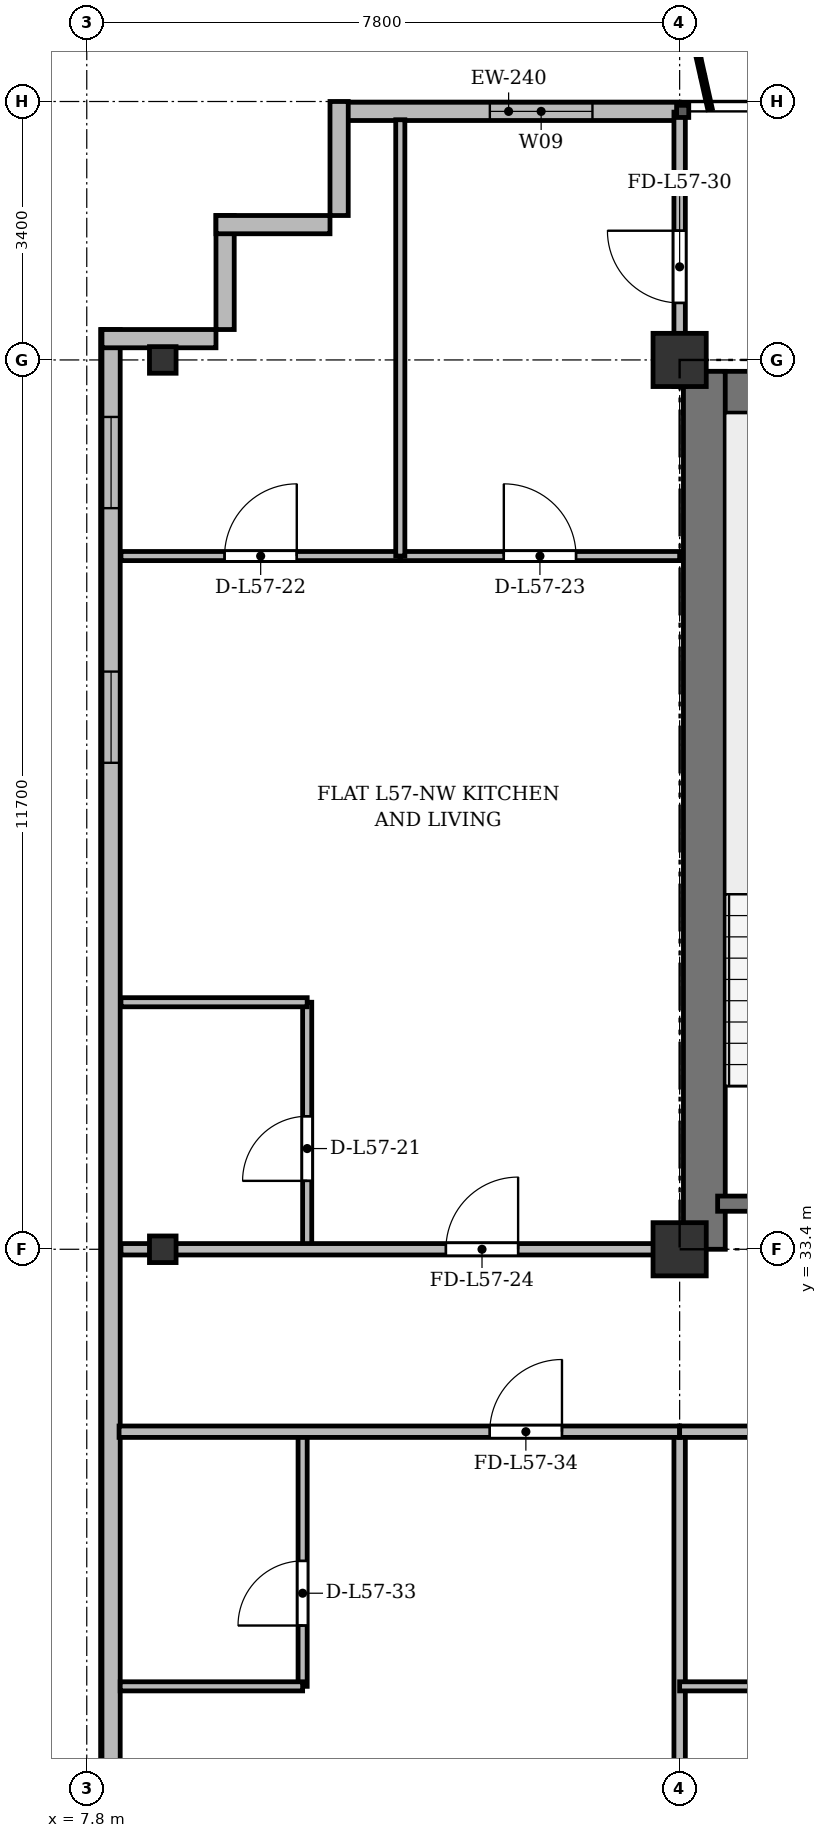
"""IFC4 building model, lengths in metres.
Left out: names, types, materials, properties, quantities, classifications, styles, units other than length and angle.
Written with IfcOpenShell. Run it as: python <this file> out.ifc"""

import sys

from ifc_helpers import new_model, si_unit, direction, frame, frame_2d, origin, origin_2d, place, context, subcontext, project, spatial, rectangle, i_section, extrude, source, transform, mapped, element, fill, save


model = new_model("IFC4")
c1 = context("Model", 3, precision=1e-05, world=origin(), true_north=direction((0.0, 1.0)))
c2 = subcontext(c1, "Body", "Model", "MODEL_VIEW")
j1 = project(units=[si_unit("LENGTHUNIT", "METRE"), si_unit("PLANEANGLEUNIT", "RADIAN")], contexts=[c1])
p1 = place(None, origin())
s1 = spatial("IfcSite", under=j1, at=p1, CompositionType="ELEMENT")
p2 = place(p1, origin())
s2 = spatial("IfcBuilding", under=s1, at=p2, CompositionType="ELEMENT")
p3 = place(p2, frame((0.0, 0.0, 219.3)))
s3 = spatial("IfcBuildingStorey", under=s2, at=p3, CompositionType="ELEMENT", Elevation=219.3)
m1 = source(origin(), c2, "Body", "SweptSolid", [
    extrude(i_section(OverallWidth=0.35, OverallDepth=0.35, WebThickness=0.018, FlangeThickness=0.028, at=origin_2d()), origin(), (0.0, 0.0, 1.0), 3.6),
])
for number, where, z_axis, x_axis in (
    (1, (8.8, 33.4, 0.0), (0.0, 0.0, 1.0), (1.0, 0.0, 0.0)),
    (2, (8.8, 45.1, 0.0), (0.0, 0.0, 1.0), (1.0, 0.0, 0.0)),
):
    element("IfcColumn", number, at=place(p3, frame(where, z_axis=z_axis, x_axis=x_axis)), inside=s3, PredefinedType="COLUMN", context=c2, shape_type="MappedRepresentation", body=[
        mapped(m1, transform((0.0, 0.0, 0.0), x_axis=(1.0, 0.0, 0.0), y_axis=(0.0, 1.0, 0.0), z_axis=(0.0, 0.0, 1.0), scale=1.0)),
    ])
m2 = source(origin(), c2, "Body", "SweptSolid", [
    extrude(rectangle(XDim=0.7, YDim=0.7, at=origin_2d()), origin(), (0.0, 0.0, 1.0), 3.6),
])
for number, where, z_axis, x_axis in (
    (3, (15.6, 33.4, 0.0), (0.0, 0.0, 1.0), (1.0, 0.0, 0.0)),
    (4, (15.6, 45.1, 0.0), (0.0, 0.0, 1.0), (1.0, 0.0, 0.0)),
):
    element("IfcColumn", number, at=place(p3, frame(where, z_axis=z_axis, x_axis=x_axis)), inside=s3, PredefinedType="COLUMN", context=c2, shape_type="MappedRepresentation", body=[
        mapped(m2, transform((0.0, 0.0, 0.0), x_axis=(1.0, 0.0, 0.0), y_axis=(0.0, 1.0, 0.0), z_axis=(0.0, 0.0, 1.0), scale=1.0)),
    ])
p4 = place(p3, frame((11.1, 48.37, 0.0), z_axis=(0.0, 0.0, 1.0), x_axis=(1.0, 0.0, 0.0)))
e5 = element("IfcWall", 5, at=p4, inside=s3, PredefinedType="SOLIDWALL", context=c2, shape_type="SweptSolid", body=[
    extrude(rectangle(XDim=4.5, YDim=0.24, at=frame_2d((2.25, 0.0))), origin(), (0.0, 0.0, 1.0), 3.36),
])
p5 = place(p4, frame((2.003, 0.0, 0.9)))
e6 = element("IfcOpeningElement", 6, at=p5, cuts=e5, PredefinedType="OPENING", context=c2, shape_type="SweptSolid", body=[
    extrude(rectangle(XDim=1.35, YDim=1.5, at=frame_2d((0.675, 0.75))), frame((0.0, 0.13, 0.0), z_axis=(0.0, -1.0, 0.0), x_axis=(1.0, 0.0, 0.0)), (0.0, 0.0, 1.0), 0.26),
])
p6 = place(p3, frame((8.12, 6.4, 0.0), z_axis=(0.0, 0.0, 1.0), x_axis=(0.0, 1.0, 0.0)))
e7 = element("IfcWall", 7, at=p6, inside=s3, PredefinedType="SOLIDWALL", context=c2, shape_type="SweptSolid", body=[
    extrude(rectangle(XDim=39.1, YDim=0.24, at=frame_2d((19.55, 0.0))), origin(), (0.0, 0.0, 1.0), 3.36),
])
p7 = place(p6, frame((1.45, 0.0, 0.92)))
e8 = element("IfcOpeningElement", 8, at=p7, cuts=e7, PredefinedType="OPENING", context=c2, shape_type="SweptSolid", body=[
    extrude(rectangle(XDim=1.2, YDim=1.65, at=frame_2d((0.6, 0.825))), frame((0.0, 0.13, 0.0), z_axis=(0.0, -1.0, 0.0), x_axis=(1.0, 0.0, 0.0)), (0.0, 0.0, 1.0), 0.26),
])
p8 = place(p6, frame((3.8, 0.0, 0.92)))
e9 = element("IfcOpeningElement", 9, at=p8, cuts=e7, PredefinedType="OPENING", context=c2, shape_type="SweptSolid", body=[
    extrude(rectangle(XDim=2.4, YDim=2.1, at=frame_2d((1.2, 1.05))), frame((0.0, 0.13, 0.0), z_axis=(0.0, -1.0, 0.0), x_axis=(1.0, 0.0, 0.0)), (0.0, 0.0, 1.0), 0.26),
])
p9 = place(p6, frame((8.0, 0.0, 0.92)))
e10 = element("IfcOpeningElement", 10, at=p9, cuts=e7, PredefinedType="OPENING", context=c2, shape_type="SweptSolid", body=[
    extrude(rectangle(XDim=2.4, YDim=2.1, at=frame_2d((1.2, 1.05))), frame((0.0, 0.13, 0.0), z_axis=(0.0, -1.0, 0.0), x_axis=(1.0, 0.0, 0.0)), (0.0, 0.0, 1.0), 0.26),
])
p10 = place(p6, frame((15.2, 0.0, 0.92)))
e11 = element("IfcOpeningElement", 11, at=p10, cuts=e7, PredefinedType="OPENING", context=c2, shape_type="SweptSolid", body=[
    extrude(rectangle(XDim=2.4, YDim=2.1, at=frame_2d((1.2, 1.05))), frame((0.0, 0.13, 0.0), z_axis=(0.0, -1.0, 0.0), x_axis=(1.0, 0.0, 0.0)), (0.0, 0.0, 1.0), 0.26),
])
p11 = place(p6, frame((33.4, 0.0, 0.92)))
e12 = element("IfcOpeningElement", 12, at=p11, cuts=e7, PredefinedType="OPENING", context=c2, shape_type="SweptSolid", body=[
    extrude(rectangle(XDim=1.2, YDim=1.65, at=frame_2d((0.6, 0.825))), frame((0.0, 0.13, 0.0), z_axis=(0.0, -1.0, 0.0), x_axis=(1.0, 0.0, 0.0)), (0.0, 0.0, 1.0), 0.26),
])
p12 = place(p6, frame((36.75, 0.0, 0.92)))
e13 = element("IfcOpeningElement", 13, at=p12, cuts=e7, PredefinedType="OPENING", context=c2, shape_type="SweptSolid", body=[
    extrude(rectangle(XDim=1.2, YDim=1.65, at=frame_2d((0.6, 0.825))), frame((0.0, 0.13, 0.0), z_axis=(0.0, -1.0, 0.0), x_axis=(1.0, 0.0, 0.0)), (0.0, 0.0, 1.0), 0.26),
])
for number, where, z_axis, x_axis in (
    (14, (8.0, 45.38, 0.0), (0.0, 0.0, 1.0), (1.0, 0.0, 0.0)),
    (15, (9.62, 45.5, 0.0), (0.0, 0.0, 1.0), (0.0, 1.0, 0.0)),
    (16, (9.5, 46.88, 0.0), (0.0, 0.0, 1.0), (1.0, 0.0, 0.0)),
    (17, (11.12, 47.0, 0.0), (0.0, 0.0, 1.0), (0.0, 1.0, 0.0)),
):
    element("IfcWall", number, at=place(p3, frame(where, z_axis=z_axis, x_axis=x_axis)), inside=s3, PredefinedType="SOLIDWALL", context=c2, shape_type="SweptSolid", body=[
        extrude(rectangle(XDim=1.5, YDim=0.24, at=frame_2d((0.75, 0.0))), origin(), (0.0, 0.0, 1.0), 3.36),
    ])
p13 = place(p3, frame((15.65, 44.675, 0.0), z_axis=(0.0, 0.0, 1.0), x_axis=(1.0, 0.0, 0.0)))
e18 = element("IfcWall", 18, at=p13, inside=s3, PredefinedType="SHEAR", context=c2, shape_type="SweptSolid", body=[
    extrude(rectangle(XDim=43.1, YDim=0.55, at=frame_2d((21.55, 0.0))), origin(), (0.0, 0.0, 1.0), 3.36),
])
p14 = place(p3, frame((15.925, 33.4, 0.0), z_axis=(0.0, 0.0, 1.0), x_axis=(0.0, 1.0, 0.0)))
e19 = element("IfcWall", 19, at=p14, inside=s3, PredefinedType="SHEAR", context=c2, shape_type="SweptSolid", body=[
    extrude(rectangle(XDim=11.55, YDim=0.55, at=frame_2d((5.775, 0.0))), origin(), (0.0, 0.0, 1.0), 3.36),
])
p15 = place(p3, frame((16.1, 34.0, 0.0), z_axis=(0.0, 0.0, 1.0), x_axis=(1.0, 0.0, 0.0)))
e20 = element("IfcWall", 20, at=p15, inside=s3, PredefinedType="SHEAR", context=c2, shape_type="SweptSolid", body=[
    extrude(rectangle(XDim=3.4, YDim=0.2, at=frame_2d((1.7, 0.0))), origin(), (0.0, 0.0, 1.0), 3.36),
])
p16 = place(p3, frame((10.7, 33.4, 0.0), z_axis=(0.0, 0.0, 1.0), x_axis=(0.0, 1.0, 0.0)))
e21 = element("IfcWall", 21, at=p16, inside=s3, PredefinedType="PARTITIONING", context=c2, shape_type="SweptSolid", body=[
    extrude(rectangle(XDim=3.25, YDim=0.12, at=frame_2d((1.625, 0.0))), origin(), (0.0, 0.0, 1.0), 2.91),
])
p17 = place(p16, frame((0.9, 0.0, 0.0)))
e22 = element("IfcOpeningElement", 22, at=p17, cuts=e21, PredefinedType="OPENING", context=c2, shape_type="SweptSolid", body=[
    extrude(rectangle(XDim=0.85, YDim=2.1, at=frame_2d((0.425, 1.05))), frame((0.0, 0.07, 0.0), z_axis=(0.0, -1.0, 0.0), x_axis=(1.0, 0.0, 0.0)), (0.0, 0.0, 1.0), 0.14),
])
p18 = place(p3, frame((8.25, 36.65, 0.0), z_axis=(0.0, 0.0, 1.0), x_axis=(1.0, 0.0, 0.0)))
e23 = element("IfcWall", 23, at=p18, inside=s3, PredefinedType="PARTITIONING", context=c2, shape_type="SweptSolid", body=[
    extrude(rectangle(XDim=2.45, YDim=0.12, at=frame_2d((1.225, 0.0))), origin(), (0.0, 0.0, 1.0), 2.86),
])
p19 = place(p3, frame((8.25, 42.52, 0.0), z_axis=(0.0, 0.0, 1.0), x_axis=(1.0, 0.0, 0.0)))
e24 = element("IfcWall", 24, at=p19, inside=s3, PredefinedType="PARTITIONING", context=c2, shape_type="SweptSolid", body=[
    extrude(rectangle(XDim=3.675, YDim=0.12, at=frame_2d((1.837, 0.0))), origin(), (0.0, 0.0, 1.0), 2.86),
])
p20 = place(p19, frame((1.363, 0.0, 0.0)))
e25 = element("IfcOpeningElement", 25, at=p20, cuts=e24, PredefinedType="OPENING", context=c2, shape_type="SweptSolid", body=[
    extrude(rectangle(XDim=0.95, YDim=2.15, at=frame_2d((0.475, 1.075))), frame((0.0, 0.07, 0.0), z_axis=(0.0, -1.0, 0.0), x_axis=(1.0, 0.0, 0.0)), (0.0, 0.0, 1.0), 0.14),
])
p21 = place(p3, frame((11.925, 42.52, 0.0), z_axis=(0.0, 0.0, 1.0), x_axis=(1.0, 0.0, 0.0)))
e26 = element("IfcWall", 26, at=p21, inside=s3, PredefinedType="PARTITIONING", context=c2, shape_type="SweptSolid", body=[
    extrude(rectangle(XDim=3.675, YDim=0.12, at=frame_2d((1.837, 0.0))), origin(), (0.0, 0.0, 1.0), 2.86),
])
p22 = place(p21, frame((1.362, 0.0, 0.0)))
e27 = element("IfcOpeningElement", 27, at=p22, cuts=e26, PredefinedType="OPENING", context=c2, shape_type="SweptSolid", body=[
    extrude(rectangle(XDim=0.95, YDim=2.15, at=frame_2d((0.475, 1.075))), frame((0.0, 0.07, 0.0), z_axis=(0.0, -1.0, 0.0), x_axis=(1.0, 0.0, 0.0)), (0.0, 0.0, 1.0), 0.14),
])
p23 = place(p3, frame((11.925, 42.52, 0.0), z_axis=(0.0, 0.0, 1.0), x_axis=(0.0, 1.0, 0.0)))
e28 = element("IfcWall", 28, at=p23, inside=s3, PredefinedType="PARTITIONING", context=c2, shape_type="SweptSolid", body=[
    extrude(rectangle(XDim=5.74, YDim=0.12, at=frame_2d((2.87, 0.0))), origin(), (0.0, 0.0, 1.0), 2.91),
])
p24 = place(p3, frame((8.25, 33.4, 0.0), z_axis=(0.0, 0.0, 1.0), x_axis=(1.0, 0.0, 0.0)))
e29 = element("IfcWall", 29, at=p24, inside=s3, PredefinedType="PARTITIONING", context=c2, shape_type="SweptSolid", body=[
    extrude(rectangle(XDim=7.35, YDim=0.15, at=frame_2d((3.675, 0.0))), origin(), (0.0, 0.0, 1.0), 2.91),
])
p25 = place(p24, frame((4.275, 0.0, 0.0)))
e30 = element("IfcOpeningElement", 30, at=p25, cuts=e29, PredefinedType="OPENING", context=c2, shape_type="SweptSolid", body=[
    extrude(rectangle(XDim=0.95, YDim=2.15, at=frame_2d((0.475, 1.075))), frame((0.0, 0.085, 0.0), z_axis=(0.0, -1.0, 0.0), x_axis=(1.0, 0.0, 0.0)), (0.0, 0.0, 1.0), 0.17),
])
p26 = place(p3, frame((15.6, 44.75, 0.0), z_axis=(0.0, 0.0, 1.0), x_axis=(0.0, 1.0, 0.0)))
e31 = element("IfcWall", 31, at=p26, inside=s3, PredefinedType="PARTITIONING", context=c2, shape_type="SweptSolid", body=[
    extrude(rectangle(XDim=3.61, YDim=0.15, at=frame_2d((1.805, 0.0))), origin(), (0.0, 0.0, 1.0), 2.86),
])
p27 = place(p26, frame((1.1, 0.0, 0.0)))
e32 = element("IfcOpeningElement", 32, at=p27, cuts=e31, PredefinedType="OPENING", context=c2, shape_type="SweptSolid", body=[
    extrude(rectangle(XDim=0.95, YDim=2.15, at=frame_2d((0.475, 1.075))), frame((0.0, 0.085, 0.0), z_axis=(0.0, -1.0, 0.0), x_axis=(1.0, 0.0, 0.0)), (0.0, 0.0, 1.0), 0.17),
])
p28 = place(p3, frame((15.6, 3.625, 0.0), z_axis=(0.0, 0.0, 1.0), x_axis=(0.0, 1.0, 0.0)))
e33 = element("IfcWall", 33, at=p28, inside=s3, PredefinedType="PARTITIONING", context=c2, shape_type="SweptSolid", body=[
    extrude(rectangle(XDim=27.375, YDim=0.15, at=frame_2d((13.688, 0.0))), origin(), (0.0, 0.0, 1.0), 2.86),
])
p29 = place(p3, frame((10.64, 27.65, 0.0), z_axis=(0.0, 0.0, 1.0), x_axis=(0.0, 1.0, 0.0)))
e34 = element("IfcWall", 34, at=p29, inside=s3, PredefinedType="PARTITIONING", context=c2, shape_type="SweptSolid", body=[
    extrude(rectangle(XDim=3.35, YDim=0.12, at=frame_2d((1.675, 0.0))), origin(), (0.0, 0.0, 1.0), 3.36),
])
p30 = place(p29, frame((0.8, 0.0, 0.0)))
e35 = element("IfcOpeningElement", 35, at=p30, cuts=e34, PredefinedType="OPENING", context=c2, shape_type="SweptSolid", body=[
    extrude(rectangle(XDim=0.85, YDim=2.1, at=frame_2d((0.425, 1.05))), frame((0.0, 0.07, 0.0), z_axis=(0.0, -1.0, 0.0), x_axis=(1.0, 0.0, 0.0)), (0.0, 0.0, 1.0), 0.14),
])
p31 = place(p3, frame((8.24, 27.65, 0.0), z_axis=(0.0, 0.0, 1.0), x_axis=(1.0, 0.0, 0.0)))
e36 = element("IfcWall", 36, at=p31, inside=s3, PredefinedType="PARTITIONING", context=c2, shape_type="SweptSolid", body=[
    extrude(rectangle(XDim=2.4, YDim=0.12, at=frame_2d((1.2, 0.0))), origin(), (0.0, 0.0, 1.0), 2.86),
])
p32 = place(p3, frame((8.225, 31.0, 0.0), z_axis=(0.0, 0.0, 1.0), x_axis=(1.0, 0.0, 0.0)))
e37 = element("IfcWall", 37, at=p32, inside=s3, PredefinedType="PARTITIONING", context=c2, shape_type="SweptSolid", body=[
    extrude(rectangle(XDim=7.375, YDim=0.15, at=frame_2d((3.688, 0.0))), origin(), (0.0, 0.0, 1.0), 2.86),
])
p33 = place(p32, frame((4.877, 0.0, 0.0)))
e38 = element("IfcOpeningElement", 38, at=p33, cuts=e37, PredefinedType="OPENING", context=c2, shape_type="SweptSolid", body=[
    extrude(rectangle(XDim=0.95, YDim=2.15, at=frame_2d((0.475, 1.075))), frame((0.0, 0.085, 0.0), z_axis=(0.0, -1.0, 0.0), x_axis=(1.0, 0.0, 0.0)), (0.0, 0.0, 1.0), 0.17),
])
p34 = place(p3, frame((15.6, 27.65, 0.0), z_axis=(0.0, 0.0, 1.0), x_axis=(1.0, 0.0, 0.0)))
e39 = element("IfcWall", 39, at=p34, inside=s3, PredefinedType="PARTITIONING", context=c2, shape_type="SweptSolid", body=[
    extrude(rectangle(XDim=2.4, YDim=0.12, at=frame_2d((1.2, 0.0))), origin(), (0.0, 0.0, 1.0), 2.86),
])
p35 = place(p3, frame((15.6, 31.0, 0.0), z_axis=(0.0, 0.0, 1.0), x_axis=(1.0, 0.0, 0.0)))
e40 = element("IfcWall", 40, at=p35, inside=s3, PredefinedType="PARTITIONING", context=c2, shape_type="SweptSolid", body=[
    extrude(rectangle(XDim=7.8, YDim=0.15, at=frame_2d((3.9, 0.0))), origin(), (0.0, 0.0, 1.0), 2.86),
])
p36 = place(p35, frame((5.172, 0.0, 0.0)))
e41 = element("IfcOpeningElement", 41, at=p36, cuts=e40, PredefinedType="OPENING", context=c2, shape_type="SweptSolid", body=[
    extrude(rectangle(XDim=0.95, YDim=2.15, at=frame_2d((0.475, 1.075))), frame((0.0, 0.085, 0.0), z_axis=(0.0, -1.0, 0.0), x_axis=(1.0, 0.0, 0.0)), (0.0, 0.0, 1.0), 0.17),
])
m3 = source(origin(), c2, "Body", "SweptSolid", [
    extrude(rectangle(XDim=1.35, YDim=1.5, at=frame_2d((0.675, 0.75))), frame((0.0, 0.03, 0.0), z_axis=(0.0, -1.0, 0.0), x_axis=(1.0, 0.0, 0.0)), (0.0, 0.0, 1.0), 0.06),
])
p37 = place(p5, origin())
e42 = element("IfcWindow", 42, at=p37, inside=s3, PartitioningType="SINGLE_PANEL", PredefinedType="WINDOW", context=c2, shape_type="MappedRepresentation", body=[
    mapped(m3, transform((0.0, 0.0, 0.0), x_axis=(1.0, 0.0, 0.0), y_axis=(0.0, 1.0, 0.0), z_axis=(0.0, 0.0, 1.0), scale=1.0)),
])
fill(e6, e42)
m4 = source(origin(), c2, "Body", "SweptSolid", [
    extrude(rectangle(XDim=1.2, YDim=1.65, at=frame_2d((0.6, 0.825))), frame((0.0, 0.03, 0.0), z_axis=(0.0, -1.0, 0.0), x_axis=(1.0, 0.0, 0.0)), (0.0, 0.0, 1.0), 0.06),
])
p38 = place(p11, origin())
e43 = element("IfcWindow", 43, at=p38, inside=s3, PartitioningType="SINGLE_PANEL", PredefinedType="WINDOW", context=c2, shape_type="MappedRepresentation", body=[
    mapped(m4, transform((0.0, 0.0, 0.0), x_axis=(1.0, 0.0, 0.0), y_axis=(0.0, 1.0, 0.0), z_axis=(0.0, 0.0, 1.0), scale=1.0)),
])
fill(e12, e43)
p39 = place(p12, origin())
e44 = element("IfcWindow", 44, at=p39, inside=s3, PartitioningType="SINGLE_PANEL", PredefinedType="WINDOW", context=c2, shape_type="MappedRepresentation", body=[
    mapped(m4, transform((0.0, 0.0, 0.0), x_axis=(1.0, 0.0, 0.0), y_axis=(0.0, 1.0, 0.0), z_axis=(0.0, 0.0, 1.0), scale=1.0)),
])
fill(e13, e44)
m5 = source(origin(), c2, "Body", "SweptSolid", [
    extrude(rectangle(XDim=0.85, YDim=2.1, at=frame_2d((0.425, 1.05))), frame((0.0, 0.025, 0.0), z_axis=(0.0, -1.0, 0.0), x_axis=(1.0, 0.0, 0.0)), (0.0, 0.0, 1.0), 0.05),
])
p40 = place(p17, origin())
e45 = element("IfcDoor", 45, at=p40, inside=s3, OperationType="SINGLE_SWING_LEFT", PredefinedType="DOOR", context=c2, shape_type="MappedRepresentation", body=[
    mapped(m5, transform((0.0, 0.0, 0.0), x_axis=(1.0, 0.0, 0.0), y_axis=(0.0, 1.0, 0.0), z_axis=(0.0, 0.0, 1.0), scale=1.0)),
])
fill(e22, e45)
m6 = source(origin(), c2, "Body", "SweptSolid", [
    extrude(rectangle(XDim=0.95, YDim=2.15, at=frame_2d((0.475, 1.075))), frame((0.0, 0.025, 0.0), z_axis=(0.0, -1.0, 0.0), x_axis=(1.0, 0.0, 0.0)), (0.0, 0.0, 1.0), 0.05),
])
p41 = place(p20, origin())
e46 = element("IfcDoor", 46, at=p41, inside=s3, OperationType="SINGLE_SWING_RIGHT", PredefinedType="DOOR", context=c2, shape_type="MappedRepresentation", body=[
    mapped(m6, transform((0.0, 0.0, 0.0), x_axis=(1.0, 0.0, 0.0), y_axis=(0.0, 1.0, 0.0), z_axis=(0.0, 0.0, 1.0), scale=1.0)),
])
fill(e25, e46)
p42 = place(p22, origin())
e47 = element("IfcDoor", 47, at=p42, inside=s3, OperationType="SINGLE_SWING_LEFT", PredefinedType="DOOR", context=c2, shape_type="MappedRepresentation", body=[
    mapped(m6, transform((0.0, 0.0, 0.0), x_axis=(1.0, 0.0, 0.0), y_axis=(0.0, 1.0, 0.0), z_axis=(0.0, 0.0, 1.0), scale=1.0)),
])
fill(e27, e47)
p43 = place(p25, origin())
e48 = element("IfcDoor", 48, at=p43, inside=s3, OperationType="SINGLE_SWING_RIGHT", PredefinedType="DOOR", context=c2, shape_type="MappedRepresentation", body=[
    mapped(m6, transform((0.0, 0.0, 0.0), x_axis=(1.0, 0.0, 0.0), y_axis=(0.0, 1.0, 0.0), z_axis=(0.0, 0.0, 1.0), scale=1.0)),
])
fill(e30, e48)
p44 = place(p27, origin())
e49 = element("IfcDoor", 49, at=p44, inside=s3, OperationType="SINGLE_SWING_RIGHT", PredefinedType="DOOR", context=c2, shape_type="MappedRepresentation", body=[
    mapped(m6, transform((0.0, 0.0, 0.0), x_axis=(1.0, 0.0, 0.0), y_axis=(0.0, 1.0, 0.0), z_axis=(0.0, 0.0, 1.0), scale=1.0)),
])
fill(e32, e49)
p45 = place(p30, origin())
e50 = element("IfcDoor", 50, at=p45, inside=s3, OperationType="SINGLE_SWING_LEFT", PredefinedType="DOOR", context=c2, shape_type="MappedRepresentation", body=[
    mapped(m5, transform((0.0, 0.0, 0.0), x_axis=(1.0, 0.0, 0.0), y_axis=(0.0, 1.0, 0.0), z_axis=(0.0, 0.0, 1.0), scale=1.0)),
])
fill(e35, e50)
p46 = place(p33, origin())
e51 = element("IfcDoor", 51, at=p46, inside=s3, OperationType="SINGLE_SWING_RIGHT", PredefinedType="DOOR", context=c2, shape_type="MappedRepresentation", body=[
    mapped(m6, transform((0.0, 0.0, 0.0), x_axis=(1.0, 0.0, 0.0), y_axis=(0.0, 1.0, 0.0), z_axis=(0.0, 0.0, 1.0), scale=1.0)),
])
fill(e38, e51)
save(model, sys.argv[1])
